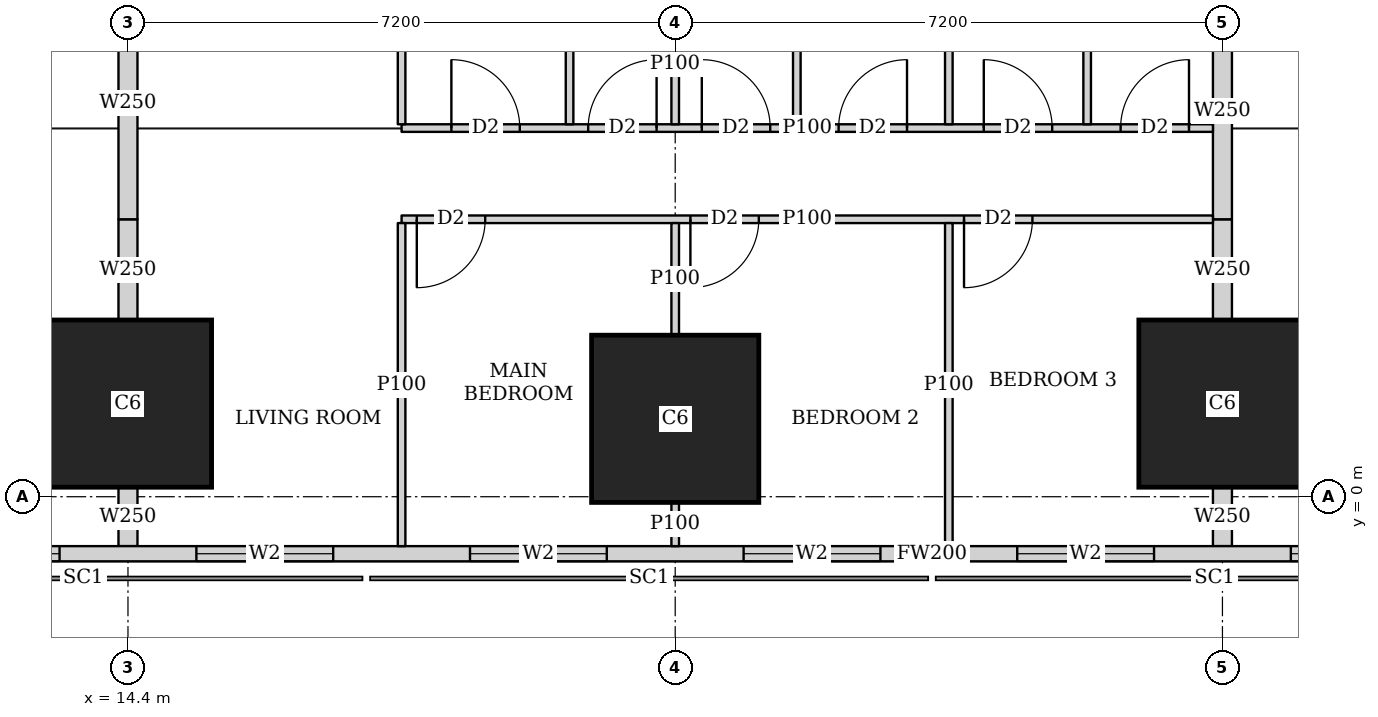
"""IFC4 building model, lengths in metres.
Left out: names, types, materials, properties, quantities, classifications, styles, units other than length and angle.
Written with IfcOpenShell. Run it as: python <this file> out.ifc"""

import sys

from ifc_helpers import new_model, si_unit, direction, frame, frame_2d, origin, origin_2d, place, context, subcontext, project, spatial, rectangle, extrude, element, fill, save


model = new_model("IFC4")
c1 = context("Model", 3, precision=1e-05, world=origin(), true_north=direction((0.0, 1.0)))
c2 = subcontext(c1, "Body", "Model", "MODEL_VIEW")
j1 = project(units=[si_unit("LENGTHUNIT", "METRE"), si_unit("PLANEANGLEUNIT", "RADIAN")], contexts=[c1])
p1 = place(None, origin())
s1 = spatial("IfcSite", under=j1, at=p1, CompositionType="ELEMENT")
p2 = place(p1, origin())
s2 = spatial("IfcBuilding", under=s1, at=p2, CompositionType="ELEMENT")
p3 = place(p2, frame((0.0, 0.0, 77.9)))
s3 = spatial("IfcBuildingStorey", under=s2, at=p3, CompositionType="ELEMENT", Elevation=77.9)
for number, where, z_axis, x_axis in (
    (1, (14.4, 1.225, 0.0), (0.0, 0.0, 1.0), (1.0, 0.0, 0.0)),
    (2, (21.6, 1.025, 0.0), (0.0, 0.0, 1.0), (1.0, 0.0, 0.0)),
    (3, (28.8, 1.225, 0.0), (0.0, 0.0, 1.0), (1.0, 0.0, 0.0)),
):
    element("IfcColumn", number, at=place(p3, frame(where, z_axis=z_axis, x_axis=x_axis)), inside=s3, PredefinedType="COLUMN", context=c2, shape_type="SweptSolid", body=[
        extrude(rectangle(XDim=2.2, YDim=2.2, at=origin_2d()), origin(), (0.0, 0.0, 1.0), 3.75),
    ])
p4 = place(p3, frame((2.163, -0.75, 0.0), z_axis=(0.0, 0.0, 1.0), x_axis=(1.0, 0.0, 0.0)))
e4 = element("IfcWall", 4, at=p4, inside=s3, PredefinedType="SOLIDWALL", context=c2, shape_type="SweptSolid", body=[
    extrude(rectangle(XDim=45.628, YDim=0.2, at=frame_2d((22.814, 0.0))), origin(), (0.0, 0.0, 1.0), 3.5),
])
p5 = place(p4, frame((9.537, 0.0, 0.9)))
e5 = element("IfcOpeningElement", 5, at=p5, cuts=e4, PredefinedType="OPENING", context=c2, shape_type="SweptSolid", body=[
    extrude(rectangle(XDim=1.8, YDim=1.5, at=frame_2d((0.9, 0.75))), frame((0.0, 0.11, 0.0), z_axis=(0.0, -1.0, 0.0), x_axis=(1.0, 0.0, 0.0)), (0.0, 0.0, 1.0), 0.22),
])
p6 = place(p4, frame((13.137, 0.0, 0.9)))
e6 = element("IfcOpeningElement", 6, at=p6, cuts=e4, PredefinedType="OPENING", context=c2, shape_type="SweptSolid", body=[
    extrude(rectangle(XDim=1.8, YDim=1.5, at=frame_2d((0.9, 0.75))), frame((0.0, 0.11, 0.0), z_axis=(0.0, -1.0, 0.0), x_axis=(1.0, 0.0, 0.0)), (0.0, 0.0, 1.0), 0.22),
])
p7 = place(p4, frame((16.737, 0.0, 0.9)))
e7 = element("IfcOpeningElement", 7, at=p7, cuts=e4, PredefinedType="OPENING", context=c2, shape_type="SweptSolid", body=[
    extrude(rectangle(XDim=1.8, YDim=1.5, at=frame_2d((0.9, 0.75))), frame((0.0, 0.11, 0.0), z_axis=(0.0, -1.0, 0.0), x_axis=(1.0, 0.0, 0.0)), (0.0, 0.0, 1.0), 0.22),
])
p8 = place(p4, frame((20.337, 0.0, 0.9)))
e8 = element("IfcOpeningElement", 8, at=p8, cuts=e4, PredefinedType="OPENING", context=c2, shape_type="SweptSolid", body=[
    extrude(rectangle(XDim=1.8, YDim=1.5, at=frame_2d((0.9, 0.75))), frame((0.0, 0.11, 0.0), z_axis=(0.0, -1.0, 0.0), x_axis=(1.0, 0.0, 0.0)), (0.0, 0.0, 1.0), 0.22),
])
p9 = place(p4, frame((23.937, 0.0, 0.9)))
e9 = element("IfcOpeningElement", 9, at=p9, cuts=e4, PredefinedType="OPENING", context=c2, shape_type="SweptSolid", body=[
    extrude(rectangle(XDim=1.8, YDim=1.5, at=frame_2d((0.9, 0.75))), frame((0.0, 0.11, 0.0), z_axis=(0.0, -1.0, 0.0), x_axis=(1.0, 0.0, 0.0)), (0.0, 0.0, 1.0), 0.22),
])
p10 = place(p4, frame((27.537, 0.0, 0.9)))
e10 = element("IfcOpeningElement", 10, at=p10, cuts=e4, PredefinedType="OPENING", context=c2, shape_type="SweptSolid", body=[
    extrude(rectangle(XDim=1.8, YDim=1.5, at=frame_2d((0.9, 0.75))), frame((0.0, 0.11, 0.0), z_axis=(0.0, -1.0, 0.0), x_axis=(1.0, 0.0, 0.0)), (0.0, 0.0, 1.0), 0.22),
])
p11 = place(p4, frame((31.137, 0.0, 0.9)))
e11 = element("IfcOpeningElement", 11, at=p11, cuts=e4, PredefinedType="OPENING", context=c2, shape_type="SweptSolid", body=[
    extrude(rectangle(XDim=1.8, YDim=1.5, at=frame_2d((0.9, 0.75))), frame((0.0, 0.11, 0.0), z_axis=(0.0, -1.0, 0.0), x_axis=(1.0, 0.0, 0.0)), (0.0, 0.0, 1.0), 0.22),
])
p12 = place(p4, frame((34.737, 0.0, 0.9)))
e12 = element("IfcOpeningElement", 12, at=p12, cuts=e4, PredefinedType="OPENING", context=c2, shape_type="SweptSolid", body=[
    extrude(rectangle(XDim=1.8, YDim=1.5, at=frame_2d((0.9, 0.75))), frame((0.0, 0.11, 0.0), z_axis=(0.0, -1.0, 0.0), x_axis=(1.0, 0.0, 0.0)), (0.0, 0.0, 1.0), 0.22),
])
p13 = place(p3, frame((28.675, 3.65, 0.0), z_axis=(0.0, 0.0, 1.0), x_axis=(-1.0, 0.0, 0.0)))
e13 = element("IfcWall", 13, at=p13, inside=s3, PredefinedType="PARTITIONING", context=c2, shape_type="SweptSolid", body=[
    extrude(rectangle(XDim=10.675, YDim=0.1, at=frame_2d((5.337, 0.0))), origin(), (0.0, 0.0, 1.0), 3.5),
])
p14 = place(p13, frame((9.575, 0.0, 0.0)))
e14 = element("IfcOpeningElement", 14, at=p14, cuts=e13, PredefinedType="OPENING", context=c2, shape_type="SweptSolid", body=[
    extrude(rectangle(XDim=0.9, YDim=2.1, at=frame_2d((0.45, 1.05))), frame((0.0, 0.06, 0.0), z_axis=(0.0, -1.0, 0.0), x_axis=(1.0, 0.0, 0.0)), (0.0, 0.0, 1.0), 0.12),
])
p15 = place(p13, frame((5.975, 0.0, 0.0)))
e15 = element("IfcOpeningElement", 15, at=p15, cuts=e13, PredefinedType="OPENING", context=c2, shape_type="SweptSolid", body=[
    extrude(rectangle(XDim=0.9, YDim=2.1, at=frame_2d((0.45, 1.05))), frame((0.0, 0.06, 0.0), z_axis=(0.0, -1.0, 0.0), x_axis=(1.0, 0.0, 0.0)), (0.0, 0.0, 1.0), 0.12),
])
p16 = place(p13, frame((2.375, 0.0, 0.0)))
e16 = element("IfcOpeningElement", 16, at=p16, cuts=e13, PredefinedType="OPENING", context=c2, shape_type="SweptSolid", body=[
    extrude(rectangle(XDim=0.9, YDim=2.1, at=frame_2d((0.45, 1.05))), frame((0.0, 0.06, 0.0), z_axis=(0.0, -1.0, 0.0), x_axis=(1.0, 0.0, 0.0)), (0.0, 0.0, 1.0), 0.12),
])
p17 = place(p3, frame((28.675, 4.85, 0.0), z_axis=(0.0, 0.0, 1.0), x_axis=(-1.0, 0.0, 0.0)))
e17 = element("IfcWall", 17, at=p17, inside=s3, PredefinedType="PARTITIONING", context=c2, shape_type="SweptSolid", body=[
    extrude(rectangle(XDim=10.675, YDim=0.1, at=frame_2d((5.337, 0.0))), origin(), (0.0, 0.0, 1.0), 3.5),
])
p18 = place(p17, frame((9.12, 0.0, 0.0)))
e18 = element("IfcOpeningElement", 18, at=p18, cuts=e17, PredefinedType="OPENING", context=c2, shape_type="SweptSolid", body=[
    extrude(rectangle(XDim=0.9, YDim=2.1, at=frame_2d((0.45, 1.05))), frame((0.0, 0.06, 0.0), z_axis=(0.0, -1.0, 0.0), x_axis=(1.0, 0.0, 0.0)), (0.0, 0.0, 1.0), 0.12),
])
p19 = place(p17, frame((5.825, 0.0, 0.0)))
e19 = element("IfcOpeningElement", 19, at=p19, cuts=e17, PredefinedType="OPENING", context=c2, shape_type="SweptSolid", body=[
    extrude(rectangle(XDim=0.9, YDim=2.1, at=frame_2d((0.45, 1.05))), frame((0.0, 0.06, 0.0), z_axis=(0.0, -1.0, 0.0), x_axis=(1.0, 0.0, 0.0)), (0.0, 0.0, 1.0), 0.12),
])
p20 = place(p17, frame((2.115, 0.0, 0.0)))
e20 = element("IfcOpeningElement", 20, at=p20, cuts=e17, PredefinedType="OPENING", context=c2, shape_type="SweptSolid", body=[
    extrude(rectangle(XDim=0.9, YDim=2.1, at=frame_2d((0.45, 1.05))), frame((0.0, 0.06, 0.0), z_axis=(0.0, -1.0, 0.0), x_axis=(1.0, 0.0, 0.0)), (0.0, 0.0, 1.0), 0.12),
])
p21 = place(p17, frame((7.32, 0.0, 0.0)))
e21 = element("IfcOpeningElement", 21, at=p21, cuts=e17, PredefinedType="OPENING", context=c2, shape_type="SweptSolid", body=[
    extrude(rectangle(XDim=0.9, YDim=2.1, at=frame_2d((0.45, 1.05))), frame((0.0, 0.06, 0.0), z_axis=(0.0, -1.0, 0.0), x_axis=(1.0, 0.0, 0.0)), (0.0, 0.0, 1.0), 0.12),
])
p22 = place(p17, frame((4.025, 0.0, 0.0)))
e22 = element("IfcOpeningElement", 22, at=p22, cuts=e17, PredefinedType="OPENING", context=c2, shape_type="SweptSolid", body=[
    extrude(rectangle(XDim=0.9, YDim=2.1, at=frame_2d((0.45, 1.05))), frame((0.0, 0.06, 0.0), z_axis=(0.0, -1.0, 0.0), x_axis=(1.0, 0.0, 0.0)), (0.0, 0.0, 1.0), 0.12),
])
p23 = place(p17, frame((0.315, 0.0, 0.0)))
e23 = element("IfcOpeningElement", 23, at=p23, cuts=e17, PredefinedType="OPENING", context=c2, shape_type="SweptSolid", body=[
    extrude(rectangle(XDim=0.9, YDim=2.1, at=frame_2d((0.45, 1.05))), frame((0.0, 0.06, 0.0), z_axis=(0.0, -1.0, 0.0), x_axis=(1.0, 0.0, 0.0)), (0.0, 0.0, 1.0), 0.12),
])
p24 = place(p3, frame((18.0, -0.65, 0.0), z_axis=(0.0, 0.0, 1.0), x_axis=(0.0, 1.0, 0.0)))
e24 = element("IfcWall", 24, at=p24, inside=s3, PredefinedType="PARTITIONING", context=c2, shape_type="SweptSolid", body=[
    extrude(rectangle(XDim=4.25, YDim=0.1, at=frame_2d((2.125, 0.0))), origin(), (0.0, 0.0, 1.0), 2.2),
])
p25 = place(p3, frame((21.6, -0.65, 0.0), z_axis=(0.0, 0.0, 1.0), x_axis=(0.0, 1.0, 0.0)))
e25 = element("IfcWall", 25, at=p25, inside=s3, PredefinedType="PARTITIONING", context=c2, shape_type="SweptSolid", body=[
    extrude(rectangle(XDim=0.574, YDim=0.1, at=frame_2d((0.287, 0.0))), origin(), (0.0, 0.0, 1.0), 3.5),
])
p26 = place(p3, frame((21.6, 2.126, 0.0), z_axis=(0.0, 0.0, 1.0), x_axis=(0.0, 1.0, 0.0)))
e26 = element("IfcWall", 26, at=p26, inside=s3, PredefinedType="PARTITIONING", context=c2, shape_type="SweptSolid", body=[
    extrude(rectangle(XDim=1.474, YDim=0.1, at=frame_2d((0.737, 0.0))), origin(), (0.0, 0.0, 1.0), 3.5),
])
p27 = place(p3, frame((25.2, -0.65, 0.0), z_axis=(0.0, 0.0, 1.0), x_axis=(0.0, 1.0, 0.0)))
e27 = element("IfcWall", 27, at=p27, inside=s3, PredefinedType="PARTITIONING", context=c2, shape_type="SweptSolid", body=[
    extrude(rectangle(XDim=4.25, YDim=0.1, at=frame_2d((2.125, 0.0))), origin(), (0.0, 0.0, 1.0), 2.2),
])
p28 = place(p3, frame((18.0, 4.9, 0.0), z_axis=(0.0, 0.0, 1.0), x_axis=(0.0, 1.0, 0.0)))
e28 = element("IfcWall", 28, at=p28, inside=s3, PredefinedType="PARTITIONING", context=c2, shape_type="SweptSolid", body=[
    extrude(rectangle(XDim=3.275, YDim=0.1, at=frame_2d((1.638, 0.0))), origin(), (0.0, 0.0, 1.0), 3.5),
])
p29 = place(p3, frame((21.6, 4.9, 0.0), z_axis=(0.0, 0.0, 1.0), x_axis=(0.0, 1.0, 0.0)))
e29 = element("IfcWall", 29, at=p29, inside=s3, PredefinedType="PARTITIONING", context=c2, shape_type="SweptSolid", body=[
    extrude(rectangle(XDim=1.599, YDim=0.1, at=frame_2d((0.8, 0.0))), origin(), (0.0, 0.0, 1.0), 3.5),
])
for number, where, z_axis, x_axis in (
    (30, (25.2, 4.9, 0.0), (0.0, 0.0, 1.0), (0.0, 1.0, 0.0)),
    (31, (20.21, 4.9, 0.0), (0.0, 0.0, 1.0), (0.0, 1.0, 0.0)),
    (32, (23.2, 4.9, 0.0), (0.0, 0.0, 1.0), (0.0, 1.0, 0.0)),
    (33, (27.02, 4.9, 0.0), (0.0, 0.0, 1.0), (0.0, 1.0, 0.0)),
):
    element("IfcWall", number, at=place(p3, frame(where, z_axis=z_axis, x_axis=x_axis)), inside=s3, PredefinedType="PARTITIONING", context=c2, shape_type="SweptSolid", body=[
        extrude(rectangle(XDim=3.275, YDim=0.1, at=frame_2d((1.638, 0.0))), origin(), (0.0, 0.0, 1.0), 3.5),
    ])
p30 = place(p3, frame((14.4, -0.65, 0.0), z_axis=(0.0, 0.0, 1.0), x_axis=(0.0, 1.0, 0.0)))
e34 = element("IfcWall", 34, at=p30, inside=s3, PredefinedType="SOLIDWALL", context=c2, shape_type="SweptSolid", body=[
    extrude(rectangle(XDim=0.774, YDim=0.25, at=frame_2d((0.387, 0.0))), origin(), (0.0, 0.0, 1.0), 3.5),
])
p31 = place(p3, frame((14.4, 2.326, 0.0), z_axis=(0.0, 0.0, 1.0), x_axis=(0.0, 1.0, 0.0)))
e35 = element("IfcWall", 35, at=p31, inside=s3, PredefinedType="SOLIDWALL", context=c2, shape_type="SweptSolid", body=[
    extrude(rectangle(XDim=1.324, YDim=0.25, at=frame_2d((0.662, 0.0))), origin(), (0.0, 0.0, 1.0), 3.5),
])
p32 = place(p3, frame((14.4, 3.65, 0.0), z_axis=(0.0, 0.0, 1.0), x_axis=(0.0, 1.0, 0.0)))
e36 = element("IfcWall", 36, at=p32, inside=s3, PredefinedType="SOLIDWALL", context=c2, shape_type="SweptSolid", body=[
    extrude(rectangle(XDim=3.049, YDim=0.25, at=frame_2d((1.524, 0.0))), origin(), (0.0, 0.0, 1.0), 3.5),
])
p33 = place(p3, frame((28.8, -0.65, 0.0), z_axis=(0.0, 0.0, 1.0), x_axis=(0.0, 1.0, 0.0)))
e37 = element("IfcWall", 37, at=p33, inside=s3, PredefinedType="SOLIDWALL", context=c2, shape_type="SweptSolid", body=[
    extrude(rectangle(XDim=0.774, YDim=0.25, at=frame_2d((0.387, 0.0))), origin(), (0.0, 0.0, 1.0), 3.5),
])
p34 = place(p3, frame((28.8, 2.326, 0.0), z_axis=(0.0, 0.0, 1.0), x_axis=(0.0, 1.0, 0.0)))
e38 = element("IfcWall", 38, at=p34, inside=s3, PredefinedType="SOLIDWALL", context=c2, shape_type="SweptSolid", body=[
    extrude(rectangle(XDim=1.324, YDim=0.25, at=frame_2d((0.662, 0.0))), origin(), (0.0, 0.0, 1.0), 3.5),
])
p35 = place(p3, frame((28.8, 3.65, 0.0), z_axis=(0.0, 0.0, 1.0), x_axis=(0.0, 1.0, 0.0)))
e39 = element("IfcWall", 39, at=p35, inside=s3, PredefinedType="SOLIDWALL", context=c2, shape_type="SweptSolid", body=[
    extrude(rectangle(XDim=2.849, YDim=0.25, at=frame_2d((1.425, 0.0))), origin(), (0.0, 0.0, 1.0), 3.5),
])
p36 = place(p5, origin())
e40 = element("IfcWindow", 40, at=p36, inside=s3, PartitioningType="SINGLE_PANEL", PredefinedType="WINDOW", context=c2, shape_type="SweptSolid", body=[
    extrude(rectangle(XDim=1.8, YDim=1.5, at=frame_2d((0.9, 0.75))), frame((0.0, 0.03, 0.0), z_axis=(0.0, -1.0, 0.0), x_axis=(1.0, 0.0, 0.0)), (0.0, 0.0, 1.0), 0.06),
])
fill(e5, e40)
p37 = place(p6, origin())
e41 = element("IfcWindow", 41, at=p37, inside=s3, PartitioningType="SINGLE_PANEL", PredefinedType="WINDOW", context=c2, shape_type="SweptSolid", body=[
    extrude(rectangle(XDim=1.8, YDim=1.5, at=frame_2d((0.9, 0.75))), frame((0.0, 0.03, 0.0), z_axis=(0.0, -1.0, 0.0), x_axis=(1.0, 0.0, 0.0)), (0.0, 0.0, 1.0), 0.06),
])
fill(e6, e41)
p38 = place(p7, origin())
e42 = element("IfcWindow", 42, at=p38, inside=s3, PartitioningType="SINGLE_PANEL", PredefinedType="WINDOW", context=c2, shape_type="SweptSolid", body=[
    extrude(rectangle(XDim=1.8, YDim=1.5, at=frame_2d((0.9, 0.75))), frame((0.0, 0.03, 0.0), z_axis=(0.0, -1.0, 0.0), x_axis=(1.0, 0.0, 0.0)), (0.0, 0.0, 1.0), 0.06),
])
fill(e7, e42)
p39 = place(p8, origin())
e43 = element("IfcWindow", 43, at=p39, inside=s3, PartitioningType="SINGLE_PANEL", PredefinedType="WINDOW", context=c2, shape_type="SweptSolid", body=[
    extrude(rectangle(XDim=1.8, YDim=1.5, at=frame_2d((0.9, 0.75))), frame((0.0, 0.03, 0.0), z_axis=(0.0, -1.0, 0.0), x_axis=(1.0, 0.0, 0.0)), (0.0, 0.0, 1.0), 0.06),
])
fill(e8, e43)
p40 = place(p9, origin())
e44 = element("IfcWindow", 44, at=p40, inside=s3, PartitioningType="SINGLE_PANEL", PredefinedType="WINDOW", context=c2, shape_type="SweptSolid", body=[
    extrude(rectangle(XDim=1.8, YDim=1.5, at=frame_2d((0.9, 0.75))), frame((0.0, 0.03, 0.0), z_axis=(0.0, -1.0, 0.0), x_axis=(1.0, 0.0, 0.0)), (0.0, 0.0, 1.0), 0.06),
])
fill(e9, e44)
p41 = place(p10, origin())
e45 = element("IfcWindow", 45, at=p41, inside=s3, PartitioningType="SINGLE_PANEL", PredefinedType="WINDOW", context=c2, shape_type="SweptSolid", body=[
    extrude(rectangle(XDim=1.8, YDim=1.5, at=frame_2d((0.9, 0.75))), frame((0.0, 0.03, 0.0), z_axis=(0.0, -1.0, 0.0), x_axis=(1.0, 0.0, 0.0)), (0.0, 0.0, 1.0), 0.06),
])
fill(e10, e45)
p42 = place(p14, origin())
e46 = element("IfcDoor", 46, at=p42, inside=s3, OperationType="SINGLE_SWING_RIGHT", PredefinedType="DOOR", context=c2, shape_type="SweptSolid", body=[
    extrude(rectangle(XDim=0.9, YDim=2.1, at=frame_2d((0.45, 1.05))), frame((0.0, 0.025, 0.0), z_axis=(0.0, -1.0, 0.0), x_axis=(1.0, 0.0, 0.0)), (0.0, 0.0, 1.0), 0.05),
])
fill(e14, e46)
p43 = place(p15, origin())
e47 = element("IfcDoor", 47, at=p43, inside=s3, OperationType="SINGLE_SWING_RIGHT", PredefinedType="DOOR", context=c2, shape_type="SweptSolid", body=[
    extrude(rectangle(XDim=0.9, YDim=2.1, at=frame_2d((0.45, 1.05))), frame((0.0, 0.025, 0.0), z_axis=(0.0, -1.0, 0.0), x_axis=(1.0, 0.0, 0.0)), (0.0, 0.0, 1.0), 0.05),
])
fill(e15, e47)
p44 = place(p16, origin())
e48 = element("IfcDoor", 48, at=p44, inside=s3, OperationType="SINGLE_SWING_RIGHT", PredefinedType="DOOR", context=c2, shape_type="SweptSolid", body=[
    extrude(rectangle(XDim=0.9, YDim=2.1, at=frame_2d((0.45, 1.05))), frame((0.0, 0.025, 0.0), z_axis=(0.0, -1.0, 0.0), x_axis=(1.0, 0.0, 0.0)), (0.0, 0.0, 1.0), 0.05),
])
fill(e16, e48)
p45 = place(p18, origin())
e49 = element("IfcDoor", 49, at=p45, inside=s3, OperationType="SINGLE_SWING_LEFT", PredefinedType="DOOR", context=c2, shape_type="SweptSolid", body=[
    extrude(rectangle(XDim=0.9, YDim=2.1, at=frame_2d((0.45, 1.05))), frame((0.0, 0.025, 0.0), z_axis=(0.0, -1.0, 0.0), x_axis=(1.0, 0.0, 0.0)), (0.0, 0.0, 1.0), 0.05),
])
fill(e18, e49)
p46 = place(p19, origin())
e50 = element("IfcDoor", 50, at=p46, inside=s3, OperationType="SINGLE_SWING_LEFT", PredefinedType="DOOR", context=c2, shape_type="SweptSolid", body=[
    extrude(rectangle(XDim=0.9, YDim=2.1, at=frame_2d((0.45, 1.05))), frame((0.0, 0.025, 0.0), z_axis=(0.0, -1.0, 0.0), x_axis=(1.0, 0.0, 0.0)), (0.0, 0.0, 1.0), 0.05),
])
fill(e19, e50)
p47 = place(p20, origin())
e51 = element("IfcDoor", 51, at=p47, inside=s3, OperationType="SINGLE_SWING_LEFT", PredefinedType="DOOR", context=c2, shape_type="SweptSolid", body=[
    extrude(rectangle(XDim=0.9, YDim=2.1, at=frame_2d((0.45, 1.05))), frame((0.0, 0.025, 0.0), z_axis=(0.0, -1.0, 0.0), x_axis=(1.0, 0.0, 0.0)), (0.0, 0.0, 1.0), 0.05),
])
fill(e20, e51)
p48 = place(p21, origin())
e52 = element("IfcDoor", 52, at=p48, inside=s3, OperationType="SINGLE_SWING_RIGHT", PredefinedType="DOOR", context=c2, shape_type="SweptSolid", body=[
    extrude(rectangle(XDim=0.9, YDim=2.1, at=frame_2d((0.45, 1.05))), frame((0.0, 0.025, 0.0), z_axis=(0.0, -1.0, 0.0), x_axis=(1.0, 0.0, 0.0)), (0.0, 0.0, 1.0), 0.05),
])
fill(e21, e52)
p49 = place(p22, origin())
e53 = element("IfcDoor", 53, at=p49, inside=s3, OperationType="SINGLE_SWING_RIGHT", PredefinedType="DOOR", context=c2, shape_type="SweptSolid", body=[
    extrude(rectangle(XDim=0.9, YDim=2.1, at=frame_2d((0.45, 1.05))), frame((0.0, 0.025, 0.0), z_axis=(0.0, -1.0, 0.0), x_axis=(1.0, 0.0, 0.0)), (0.0, 0.0, 1.0), 0.05),
])
fill(e22, e53)
p50 = place(p23, origin())
e54 = element("IfcDoor", 54, at=p50, inside=s3, OperationType="SINGLE_SWING_RIGHT", PredefinedType="DOOR", context=c2, shape_type="SweptSolid", body=[
    extrude(rectangle(XDim=0.9, YDim=2.1, at=frame_2d((0.45, 1.05))), frame((0.0, 0.025, 0.0), z_axis=(0.0, -1.0, 0.0), x_axis=(1.0, 0.0, 0.0)), (0.0, 0.0, 1.0), 0.05),
])
fill(e23, e54)
save(model, sys.argv[1])
